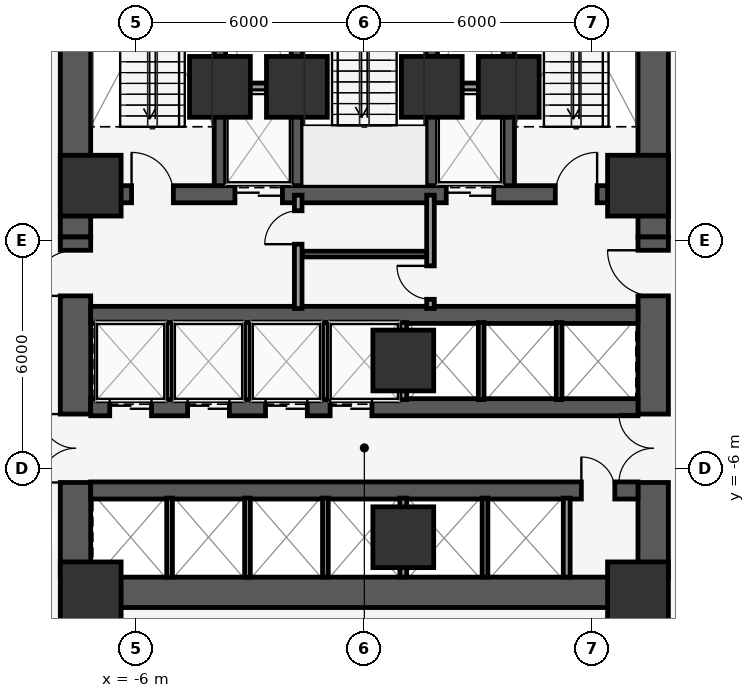
"""IFC4 building model, lengths in metres.
Left out: names, types, materials, properties, quantities, classifications, styles, units other than length and angle.
Written with IfcOpenShell. Run it as: python <this file> out.ifc"""

import sys

from ifc_helpers import new_model, si_unit, direction, frame, frame_2d, origin, origin_2d, place, context, subcontext, project, spatial, rectangle, extrude, element, fill, save


model = new_model("IFC4")
c1 = context("Model", 3, precision=1e-05, world=origin(), true_north=direction((0.0, 1.0)))
c2 = subcontext(c1, "Body", "Model", "MODEL_VIEW")
j1 = project(units=[si_unit("LENGTHUNIT", "METRE"), si_unit("PLANEANGLEUNIT", "RADIAN")], contexts=[c1])
p1 = place(None, origin())
s1 = spatial("IfcSite", under=j1, at=p1, CompositionType="ELEMENT")
p2 = place(p1, origin())
s2 = spatial("IfcBuilding", under=s1, at=p2, CompositionType="ELEMENT")
p3 = place(p2, frame((0.0, 0.0, 17.5)))
s3 = spatial("IfcBuildingStorey", under=s2, at=p3, CompositionType="ELEMENT", Elevation=17.5)
p4 = place(p3, frame((-7.2, 1.225, 0.0), z_axis=(0.0, 0.0, 1.0), x_axis=(1.0, 0.0, 0.0)))
e1 = element("IfcWall", 1, at=p4, inside=s3, PredefinedType="SHEAR", context=c2, shape_type="SweptSolid", body=[
    extrude(rectangle(XDim=14.4, YDim=0.45, at=frame_2d((7.2, 0.0))), origin(), (0.0, 0.0, 1.0), 5.7),
])
p5 = place(p4, frame((3.795, 0.0, 0.0)))
e2 = element("IfcOpeningElement", 2, at=p5, cuts=e1, PredefinedType="OPENING", context=c2, shape_type="SweptSolid", body=[
    extrude(rectangle(XDim=1.25, YDim=2.25, at=frame_2d((0.625, 1.125))), frame((0.0, 0.235, 0.0), z_axis=(0.0, -1.0, 0.0), x_axis=(1.0, 0.0, 0.0)), (0.0, 0.0, 1.0), 0.47),
])
p6 = place(p4, frame((9.355, 0.0, 0.0)))
e3 = element("IfcOpeningElement", 3, at=p6, cuts=e1, PredefinedType="OPENING", context=c2, shape_type="SweptSolid", body=[
    extrude(rectangle(XDim=1.25, YDim=2.25, at=frame_2d((0.625, 1.125))), frame((0.0, 0.235, 0.0), z_axis=(0.0, -1.0, 0.0), x_axis=(1.0, 0.0, 0.0)), (0.0, 0.0, 1.0), 0.47),
])
p7 = place(p4, frame((1.075, 0.0, 0.0)))
e4 = element("IfcOpeningElement", 4, at=p7, cuts=e1, PredefinedType="OPENING", context=c2, shape_type="SweptSolid", body=[
    extrude(rectangle(XDim=1.1, YDim=2.15, at=frame_2d((0.55, 1.075))), frame((0.0, 0.235, 0.0), z_axis=(0.0, -1.0, 0.0), x_axis=(1.0, 0.0, 0.0)), (0.0, 0.0, 1.0), 0.47),
])
p8 = place(p4, frame((12.225, 0.0, 0.0)))
e5 = element("IfcOpeningElement", 5, at=p8, cuts=e1, PredefinedType="OPENING", context=c2, shape_type="SweptSolid", body=[
    extrude(rectangle(XDim=1.1, YDim=2.15, at=frame_2d((0.55, 1.075))), frame((0.0, 0.235, 0.0), z_axis=(0.0, -1.0, 0.0), x_axis=(1.0, 0.0, 0.0)), (0.0, 0.0, 1.0), 0.47),
])
for number, where, z_axis, x_axis in (
    (6, (-3.8, 1.45, 0.0), (0.0, 0.0, 1.0), (0.0, 1.0, 0.0)),
    (7, (-1.775, 1.45, 0.0), (0.0, 0.0, 1.0), (0.0, 1.0, 0.0)),
    (8, (1.775, 1.45, 0.0), (0.0, 0.0, 1.0), (0.0, 1.0, 0.0)),
    (9, (3.8, 1.45, 0.0), (0.0, 0.0, 1.0), (0.0, 1.0, 0.0)),
):
    element("IfcWall", number, at=place(p3, frame(where, z_axis=z_axis, x_axis=x_axis)), inside=s3, PredefinedType="SHEAR", context=c2, shape_type="SweptSolid", body=[
        extrude(rectangle(XDim=7.7, YDim=0.3, at=frame_2d((3.85, 0.0))), origin(), (0.0, 0.0, 1.0), 5.7),
    ])
for number, where, z_axis, x_axis in (
    (10, (-7.6, 0.1, 0.0), (0.0, 0.0, 1.0), (0.0, 1.0, 0.0)),
    (11, (7.6, 0.1, 0.0), (0.0, 0.0, 1.0), (0.0, 1.0, 0.0)),
):
    element("IfcWall", number, at=place(p3, frame(where, z_axis=z_axis, x_axis=x_axis)), inside=s3, PredefinedType="SHEAR", context=c2, shape_type="SweptSolid", body=[
        extrude(rectangle(XDim=9.05, YDim=0.8, at=frame_2d((4.525, 0.0))), origin(), (0.0, 0.0, 1.0), 5.7),
    ])
p9 = place(p3, frame((-7.6, -8.85, 0.0), z_axis=(0.0, 0.0, 1.0), x_axis=(0.0, 1.0, 0.0)))
e12 = element("IfcWall", 12, at=p9, inside=s3, PredefinedType="SHEAR", context=c2, shape_type="SweptSolid", body=[
    extrude(rectangle(XDim=8.95, YDim=0.8, at=frame_2d((4.475, 0.0))), origin(), (0.0, 0.0, 1.0), 5.7),
])
p10 = place(p9, frame((2.49, 0.0, 0.0)))
e13 = element("IfcOpeningElement", 13, at=p10, cuts=e12, PredefinedType="OPENING", context=c2, shape_type="SweptSolid", body=[
    extrude(rectangle(XDim=1.8, YDim=2.2, at=frame_2d((0.9, 1.1))), frame((0.0, 0.41, 0.0), z_axis=(0.0, -1.0, 0.0), x_axis=(1.0, 0.0, 0.0)), (0.0, 0.0, 1.0), 0.82),
])
p11 = place(p9, frame((7.4, 0.0, 0.0)))
e14 = element("IfcOpeningElement", 14, at=p11, cuts=e12, PredefinedType="OPENING", context=c2, shape_type="SweptSolid", body=[
    extrude(rectangle(XDim=1.2, YDim=2.15, at=frame_2d((0.6, 1.075))), frame((0.0, 0.41, 0.0), z_axis=(0.0, -1.0, 0.0), x_axis=(1.0, 0.0, 0.0)), (0.0, 0.0, 1.0), 0.82),
])
p12 = place(p3, frame((7.6, -8.85, 0.0), z_axis=(0.0, 0.0, 1.0), x_axis=(0.0, 1.0, 0.0)))
e15 = element("IfcWall", 15, at=p12, inside=s3, PredefinedType="SHEAR", context=c2, shape_type="SweptSolid", body=[
    extrude(rectangle(XDim=8.95, YDim=0.8, at=frame_2d((4.475, 0.0))), origin(), (0.0, 0.0, 1.0), 5.7),
])
p13 = place(p12, frame((2.49, 0.0, 0.0)))
e16 = element("IfcOpeningElement", 16, at=p13, cuts=e15, PredefinedType="OPENING", context=c2, shape_type="SweptSolid", body=[
    extrude(rectangle(XDim=1.8, YDim=2.2, at=frame_2d((0.9, 1.1))), frame((0.0, 0.41, 0.0), z_axis=(0.0, -1.0, 0.0), x_axis=(1.0, 0.0, 0.0)), (0.0, 0.0, 1.0), 0.82),
])
p14 = place(p12, frame((7.4, 0.0, 0.0)))
e17 = element("IfcOpeningElement", 17, at=p14, cuts=e15, PredefinedType="OPENING", context=c2, shape_type="SweptSolid", body=[
    extrude(rectangle(XDim=1.2, YDim=2.15, at=frame_2d((0.6, 1.075))), frame((0.0, 0.41, 0.0), z_axis=(0.0, -1.0, 0.0), x_axis=(1.0, 0.0, 0.0)), (0.0, 0.0, 1.0), 0.82),
])
p15 = place(p3, frame((-7.6, -9.25, 0.0), z_axis=(0.0, 0.0, 1.0), x_axis=(1.0, 0.0, 0.0)))
e18 = element("IfcWall", 18, at=p15, inside=s3, PredefinedType="SHEAR", context=c2, shape_type="SweptSolid", body=[
    extrude(rectangle(XDim=15.2, YDim=0.8, at=frame_2d((7.6, 0.0))), origin(), (0.0, 0.0, 1.0), 5.7),
])
p16 = place(p3, frame((-7.2, -1.95, 0.0), z_axis=(0.0, 0.0, 1.0), x_axis=(1.0, 0.0, 0.0)))
e19 = element("IfcWall", 19, at=p16, inside=s3, PredefinedType="SHEAR", context=c2, shape_type="SweptSolid", body=[
    extrude(rectangle(XDim=14.4, YDim=0.45, at=frame_2d((7.2, 0.0))), origin(), (0.0, 0.0, 1.0), 5.7),
])
p17 = place(p3, frame((-7.2, -4.38, 0.0), z_axis=(0.0, 0.0, 1.0), x_axis=(1.0, 0.0, 0.0)))
e20 = element("IfcWall", 20, at=p17, inside=s3, PredefinedType="SHEAR", context=c2, shape_type="SweptSolid", body=[
    extrude(rectangle(XDim=14.4, YDim=0.45, at=frame_2d((7.2, 0.0))), origin(), (0.0, 0.0, 1.0), 5.7),
])
p18 = place(p17, frame((0.5, 0.0, 0.0)))
e21 = element("IfcOpeningElement", 21, at=p18, cuts=e20, PredefinedType="OPENING", context=c2, shape_type="SweptSolid", body=[
    extrude(rectangle(XDim=1.1, YDim=2.2, at=frame_2d((0.55, 1.1))), frame((0.0, 0.235, 0.0), z_axis=(0.0, -1.0, 0.0), x_axis=(1.0, 0.0, 0.0)), (0.0, 0.0, 1.0), 0.47),
])
p19 = place(p17, frame((2.55, 0.0, 0.0)))
e22 = element("IfcOpeningElement", 22, at=p19, cuts=e20, PredefinedType="OPENING", context=c2, shape_type="SweptSolid", body=[
    extrude(rectangle(XDim=1.1, YDim=2.2, at=frame_2d((0.55, 1.1))), frame((0.0, 0.235, 0.0), z_axis=(0.0, -1.0, 0.0), x_axis=(1.0, 0.0, 0.0)), (0.0, 0.0, 1.0), 0.47),
])
p20 = place(p17, frame((4.6, 0.0, 0.0)))
e23 = element("IfcOpeningElement", 23, at=p20, cuts=e20, PredefinedType="OPENING", context=c2, shape_type="SweptSolid", body=[
    extrude(rectangle(XDim=1.1, YDim=2.2, at=frame_2d((0.55, 1.1))), frame((0.0, 0.235, 0.0), z_axis=(0.0, -1.0, 0.0), x_axis=(1.0, 0.0, 0.0)), (0.0, 0.0, 1.0), 0.47),
])
p21 = place(p17, frame((6.3, 0.0, 0.0)))
e24 = element("IfcOpeningElement", 24, at=p21, cuts=e20, PredefinedType="OPENING", context=c2, shape_type="SweptSolid", body=[
    extrude(rectangle(XDim=1.1, YDim=2.2, at=frame_2d((0.55, 1.1))), frame((0.0, 0.235, 0.0), z_axis=(0.0, -1.0, 0.0), x_axis=(1.0, 0.0, 0.0)), (0.0, 0.0, 1.0), 0.47),
])
p22 = place(p3, frame((-7.2, -6.57, 0.0), z_axis=(0.0, 0.0, 1.0), x_axis=(1.0, 0.0, 0.0)))
e25 = element("IfcWall", 25, at=p22, inside=s3, PredefinedType="SHEAR", context=c2, shape_type="SweptSolid", body=[
    extrude(rectangle(XDim=14.4, YDim=0.45, at=frame_2d((7.2, 0.0))), origin(), (0.0, 0.0, 1.0), 5.7),
])
p23 = place(p22, frame((12.91, 0.0, 0.0)))
e26 = element("IfcOpeningElement", 26, at=p23, cuts=e25, PredefinedType="OPENING", context=c2, shape_type="SweptSolid", body=[
    extrude(rectangle(XDim=0.88, YDim=2.15, at=frame_2d((0.44, 1.075))), frame((0.0, 0.235, 0.0), z_axis=(0.0, -1.0, 0.0), x_axis=(1.0, 0.0, 0.0)), (0.0, 0.0, 1.0), 0.47),
])
for number, where, z_axis, x_axis in (
    (27, (-7.2, -9.25, 0.0), (0.0, 0.0, 1.0), (1.0, 0.0, 0.0)),
    (28, (7.2, -9.25, 0.0), (0.0, 0.0, 1.0), (1.0, 0.0, 0.0)),
    (29, (7.2, 1.45, 0.0), (0.0, 0.0, 1.0), (1.0, 0.0, 0.0)),
    (30, (-7.2, 1.45, 0.0), (0.0, 0.0, 1.0), (1.0, 0.0, 0.0)),
    (31, (-3.8, 4.05, 0.0), (0.0, 0.0, 1.0), (1.0, 0.0, 0.0)),
    (32, (3.8, 4.05, 0.0), (0.0, 0.0, 1.0), (1.0, 0.0, 0.0)),
    (33, (-1.775, 4.05, 0.0), (0.0, 0.0, 1.0), (1.0, 0.0, 0.0)),
    (34, (1.775, 4.05, 0.0), (0.0, 0.0, 1.0), (1.0, 0.0, 0.0)),
    (35, (1.025, -3.15, 0.0), (0.0, 0.0, 1.0), (1.0, 0.0, 0.0)),
    (36, (1.025, -7.8, 0.0), (0.0, 0.0, 1.0), (1.0, 0.0, 0.0)),
):
    element("IfcColumn", number, at=place(p3, frame(where, z_axis=z_axis, x_axis=x_axis)), inside=s3, PredefinedType="COLUMN", context=c2, shape_type="SweptSolid", body=[
        extrude(rectangle(XDim=1.6, YDim=1.6, at=origin_2d()), origin(), (0.0, 0.0, 1.0), 6.0),
    ])
for number, where, z_axis, x_axis in (
    (37, (-3.65, 4.05, 0.0), (0.0, 0.0, 1.0), (1.0, 0.0, 0.0)),
    (38, (1.92, 4.05, 0.0), (0.0, 0.0, 1.0), (1.0, 0.0, 0.0)),
):
    element("IfcWall", number, at=place(p3, frame(where, z_axis=z_axis, x_axis=x_axis)), inside=s3, PredefinedType="PARTITIONING", context=c2, shape_type="SweptSolid", body=[
        extrude(rectangle(XDim=1.73, YDim=0.2, at=frame_2d((0.865, 0.0))), origin(), (0.0, 0.0, 1.0), 5.7),
    ])
for number, where, z_axis, x_axis in (
    (39, (-5.125, -4.18, 0.0), (0.0, 0.0, 1.0), (0.0, 1.0, 0.0)),
    (40, (-3.075, -4.18, 0.0), (0.0, 0.0, 1.0), (0.0, 1.0, 0.0)),
    (41, (-1.025, -4.18, 0.0), (0.0, 0.0, 1.0), (0.0, 1.0, 0.0)),
):
    element("IfcWall", number, at=place(p3, frame(where, z_axis=z_axis, x_axis=x_axis)), inside=s3, PredefinedType="PARTITIONING", context=c2, shape_type="SweptSolid", body=[
        extrude(rectangle(XDim=2.03, YDim=0.15, at=frame_2d((1.015, 0.0))), origin(), (0.0, 0.0, 1.0), 5.7),
    ])
p24 = place(p3, frame((1.025, -4.18, 0.0), z_axis=(0.0, 0.0, 1.0), x_axis=(0.0, 1.0, 0.0)))
e42 = element("IfcWall", 42, at=p24, inside=s3, PredefinedType="PARTITIONING", context=c2, shape_type="SweptSolid", body=[
    extrude(rectangle(XDim=2.03, YDim=0.18, at=frame_2d((1.015, 0.0))), origin(), (0.0, 0.0, 1.0), 4.748),
])
for number, where, z_axis, x_axis in (
    (43, (3.075, -4.18, 0.0), (0.0, 0.0, 1.0), (0.0, 1.0, 0.0)),
    (44, (5.125, -4.18, 0.0), (0.0, 0.0, 1.0), (0.0, 1.0, 0.0)),
):
    element("IfcWall", number, at=place(p3, frame(where, z_axis=z_axis, x_axis=x_axis)), inside=s3, PredefinedType="PARTITIONING", context=c2, shape_type="SweptSolid", body=[
        extrude(rectangle(XDim=2.03, YDim=0.15, at=frame_2d((1.015, 0.0))), origin(), (0.0, 0.0, 1.0), 5.7),
    ])
for number, where, z_axis, x_axis in (
    (45, (-5.125, -8.85, 0.0), (0.0, 0.0, 1.0), (0.0, 1.0, 0.0)),
    (46, (-3.075, -8.85, 0.0), (0.0, 0.0, 1.0), (0.0, 1.0, 0.0)),
    (47, (-1.025, -8.85, 0.0), (0.0, 0.0, 1.0), (0.0, 1.0, 0.0)),
):
    element("IfcWall", number, at=place(p3, frame(where, z_axis=z_axis, x_axis=x_axis)), inside=s3, PredefinedType="PARTITIONING", context=c2, shape_type="SweptSolid", body=[
        extrude(rectangle(XDim=2.08, YDim=0.15, at=frame_2d((1.04, 0.0))), origin(), (0.0, 0.0, 1.0), 5.7),
    ])
p25 = place(p3, frame((1.025, -8.85, 0.0), z_axis=(0.0, 0.0, 1.0), x_axis=(0.0, 1.0, 0.0)))
e48 = element("IfcWall", 48, at=p25, inside=s3, PredefinedType="PARTITIONING", context=c2, shape_type="SweptSolid", body=[
    extrude(rectangle(XDim=2.08, YDim=0.18, at=frame_2d((1.04, 0.0))), origin(), (0.0, 0.0, 1.0), 4.748),
])
p26 = place(p3, frame((3.175, -8.85, 0.0), z_axis=(0.0, 0.0, 1.0), x_axis=(0.0, 1.0, 0.0)))
e49 = element("IfcWall", 49, at=p26, inside=s3, PredefinedType="PARTITIONING", context=c2, shape_type="SweptSolid", body=[
    extrude(rectangle(XDim=2.08, YDim=0.15, at=frame_2d((1.04, 0.0))), origin(), (0.0, 0.0, 1.0), 5.7),
])
p27 = place(p3, frame((5.325, -8.85, 0.0), z_axis=(0.0, 0.0, 1.0), x_axis=(0.0, 1.0, 0.0)))
e50 = element("IfcWall", 50, at=p27, inside=s3, PredefinedType="PARTITIONING", context=c2, shape_type="SweptSolid", body=[
    extrude(rectangle(XDim=2.08, YDim=0.18, at=frame_2d((1.04, 0.0))), origin(), (0.0, 0.0, 1.0), 5.7),
])
p28 = place(p3, frame((-1.74, -1.78, 0.0), z_axis=(0.0, 0.0, 1.0), x_axis=(0.0, 1.0, 0.0)))
e51 = element("IfcWall", 51, at=p28, inside=s3, PredefinedType="PARTITIONING", context=c2, shape_type="SweptSolid", body=[
    extrude(rectangle(XDim=2.98, YDim=0.2, at=frame_2d((1.49, 0.0))), origin(), (0.0, 0.0, 1.0), 5.7),
])
p29 = place(p28, frame((1.69, 0.0, 0.0)))
e52 = element("IfcOpeningElement", 52, at=p29, cuts=e51, PredefinedType="OPENING", context=c2, shape_type="SweptSolid", body=[
    extrude(rectangle(XDim=0.88, YDim=2.15, at=frame_2d((0.44, 1.075))), frame((0.0, 0.11, 0.0), z_axis=(0.0, -1.0, 0.0), x_axis=(1.0, 0.0, 0.0)), (0.0, 0.0, 1.0), 0.22),
])
p30 = place(p3, frame((1.74, -1.78, 0.0), z_axis=(0.0, 0.0, 1.0), x_axis=(0.0, 1.0, 0.0)))
e53 = element("IfcWall", 53, at=p30, inside=s3, PredefinedType="PARTITIONING", context=c2, shape_type="SweptSolid", body=[
    extrude(rectangle(XDim=2.98, YDim=0.2, at=frame_2d((1.49, 0.0))), origin(), (0.0, 0.0, 1.0), 5.7),
])
p31 = place(p30, frame((0.24, 0.0, 0.0)))
e54 = element("IfcOpeningElement", 54, at=p31, cuts=e53, PredefinedType="OPENING", context=c2, shape_type="SweptSolid", body=[
    extrude(rectangle(XDim=0.88, YDim=2.15, at=frame_2d((0.44, 1.075))), frame((0.0, 0.11, 0.0), z_axis=(0.0, -1.0, 0.0), x_axis=(1.0, 0.0, 0.0)), (0.0, 0.0, 1.0), 0.22),
])
p32 = place(p3, frame((-1.63, -0.35, 0.0), z_axis=(0.0, 0.0, 1.0), x_axis=(1.0, 0.0, 0.0)))
e55 = element("IfcWall", 55, at=p32, inside=s3, PredefinedType="PARTITIONING", context=c2, shape_type="SweptSolid", body=[
    extrude(rectangle(XDim=3.26, YDim=0.15, at=frame_2d((1.63, 0.0))), origin(), (0.0, 0.0, 1.0), 5.7),
])
p33 = place(p18, origin())
e56 = element("IfcDoor", 56, at=p33, inside=s3, OperationType="DOUBLE_DOOR_SLIDING", PredefinedType="DOOR", context=c2, shape_type="SweptSolid", body=[
    extrude(rectangle(XDim=1.1, YDim=2.2, at=frame_2d((0.55, 1.1))), frame((0.0, 0.025, 0.0), z_axis=(0.0, -1.0, 0.0), x_axis=(1.0, 0.0, 0.0)), (0.0, 0.0, 1.0), 0.05),
])
fill(e21, e56)
p34 = place(p19, origin())
e57 = element("IfcDoor", 57, at=p34, inside=s3, OperationType="DOUBLE_DOOR_SLIDING", PredefinedType="DOOR", context=c2, shape_type="SweptSolid", body=[
    extrude(rectangle(XDim=1.1, YDim=2.2, at=frame_2d((0.55, 1.1))), frame((0.0, 0.025, 0.0), z_axis=(0.0, -1.0, 0.0), x_axis=(1.0, 0.0, 0.0)), (0.0, 0.0, 1.0), 0.05),
])
fill(e22, e57)
p35 = place(p20, origin())
e58 = element("IfcDoor", 58, at=p35, inside=s3, OperationType="DOUBLE_DOOR_SLIDING", PredefinedType="DOOR", context=c2, shape_type="SweptSolid", body=[
    extrude(rectangle(XDim=1.1, YDim=2.2, at=frame_2d((0.55, 1.1))), frame((0.0, 0.025, 0.0), z_axis=(0.0, -1.0, 0.0), x_axis=(1.0, 0.0, 0.0)), (0.0, 0.0, 1.0), 0.05),
])
fill(e23, e58)
p36 = place(p21, origin())
e59 = element("IfcDoor", 59, at=p36, inside=s3, OperationType="DOUBLE_DOOR_SLIDING", PredefinedType="DOOR", context=c2, shape_type="SweptSolid", body=[
    extrude(rectangle(XDim=1.1, YDim=2.2, at=frame_2d((0.55, 1.1))), frame((0.0, 0.025, 0.0), z_axis=(0.0, -1.0, 0.0), x_axis=(1.0, 0.0, 0.0)), (0.0, 0.0, 1.0), 0.05),
])
fill(e24, e59)
p37 = place(p5, origin())
e60 = element("IfcDoor", 60, at=p37, inside=s3, OperationType="DOUBLE_DOOR_SLIDING", PredefinedType="DOOR", context=c2, shape_type="SweptSolid", body=[
    extrude(rectangle(XDim=1.25, YDim=2.25, at=frame_2d((0.625, 1.125))), frame((0.0, 0.025, 0.0), z_axis=(0.0, -1.0, 0.0), x_axis=(1.0, 0.0, 0.0)), (0.0, 0.0, 1.0), 0.05),
])
fill(e2, e60)
p38 = place(p6, origin())
e61 = element("IfcDoor", 61, at=p38, inside=s3, OperationType="DOUBLE_DOOR_SLIDING", PredefinedType="DOOR", context=c2, shape_type="SweptSolid", body=[
    extrude(rectangle(XDim=1.25, YDim=2.25, at=frame_2d((0.625, 1.125))), frame((0.0, 0.025, 0.0), z_axis=(0.0, -1.0, 0.0), x_axis=(1.0, 0.0, 0.0)), (0.0, 0.0, 1.0), 0.05),
])
fill(e3, e61)
p39 = place(p7, origin())
e62 = element("IfcDoor", 62, at=p39, inside=s3, OperationType="SINGLE_SWING_LEFT", PredefinedType="DOOR", context=c2, shape_type="SweptSolid", body=[
    extrude(rectangle(XDim=1.1, YDim=2.15, at=frame_2d((0.55, 1.075))), frame((0.0, 0.025, 0.0), z_axis=(0.0, -1.0, 0.0), x_axis=(1.0, 0.0, 0.0)), (0.0, 0.0, 1.0), 0.05),
])
fill(e4, e62)
p40 = place(p8, origin())
e63 = element("IfcDoor", 63, at=p40, inside=s3, OperationType="SINGLE_SWING_RIGHT", PredefinedType="DOOR", context=c2, shape_type="SweptSolid", body=[
    extrude(rectangle(XDim=1.1, YDim=2.15, at=frame_2d((0.55, 1.075))), frame((0.0, 0.025, 0.0), z_axis=(0.0, -1.0, 0.0), x_axis=(1.0, 0.0, 0.0)), (0.0, 0.0, 1.0), 0.05),
])
fill(e5, e63)
p41 = place(p10, origin())
e64 = element("IfcDoor", 64, at=p41, inside=s3, OperationType="DOUBLE_DOOR_SINGLE_SWING", PredefinedType="DOOR", context=c2, shape_type="SweptSolid", body=[
    extrude(rectangle(XDim=1.8, YDim=2.2, at=frame_2d((0.9, 1.1))), frame((0.0, 0.025, 0.0), z_axis=(0.0, -1.0, 0.0), x_axis=(1.0, 0.0, 0.0)), (0.0, 0.0, 1.0), 0.05),
])
fill(e13, e64)
p42 = place(p11, origin())
e65 = element("IfcDoor", 65, at=p42, inside=s3, OperationType="SINGLE_SWING_LEFT", PredefinedType="DOOR", context=c2, shape_type="SweptSolid", body=[
    extrude(rectangle(XDim=1.2, YDim=2.15, at=frame_2d((0.6, 1.075))), frame((0.0, 0.025, 0.0), z_axis=(0.0, -1.0, 0.0), x_axis=(1.0, 0.0, 0.0)), (0.0, 0.0, 1.0), 0.05),
])
fill(e14, e65)
p43 = place(p13, origin())
e66 = element("IfcDoor", 66, at=p43, inside=s3, OperationType="DOUBLE_DOOR_SINGLE_SWING", PredefinedType="DOOR", context=c2, shape_type="SweptSolid", body=[
    extrude(rectangle(XDim=1.8, YDim=2.2, at=frame_2d((0.9, 1.1))), frame((0.0, 0.025, 0.0), z_axis=(0.0, -1.0, 0.0), x_axis=(1.0, 0.0, 0.0)), (0.0, 0.0, 1.0), 0.05),
])
fill(e16, e66)
p44 = place(p14, origin())
e67 = element("IfcDoor", 67, at=p44, inside=s3, OperationType="SINGLE_SWING_RIGHT", PredefinedType="DOOR", context=c2, shape_type="SweptSolid", body=[
    extrude(rectangle(XDim=1.2, YDim=2.15, at=frame_2d((0.6, 1.075))), frame((0.0, 0.025, 0.0), z_axis=(0.0, -1.0, 0.0), x_axis=(1.0, 0.0, 0.0)), (0.0, 0.0, 1.0), 0.05),
])
fill(e17, e67)
p45 = place(p23, origin())
e68 = element("IfcDoor", 68, at=p45, inside=s3, OperationType="SINGLE_SWING_LEFT", PredefinedType="DOOR", context=c2, shape_type="SweptSolid", body=[
    extrude(rectangle(XDim=0.88, YDim=2.15, at=frame_2d((0.44, 1.075))), frame((0.0, 0.025, 0.0), z_axis=(0.0, -1.0, 0.0), x_axis=(1.0, 0.0, 0.0)), (0.0, 0.0, 1.0), 0.05),
])
fill(e26, e68)
p46 = place(p29, origin())
e69 = element("IfcDoor", 69, at=p46, inside=s3, OperationType="SINGLE_SWING_LEFT", PredefinedType="DOOR", context=c2, shape_type="SweptSolid", body=[
    extrude(rectangle(XDim=0.88, YDim=2.15, at=frame_2d((0.44, 1.075))), frame((0.0, 0.025, 0.0), z_axis=(0.0, -1.0, 0.0), x_axis=(1.0, 0.0, 0.0)), (0.0, 0.0, 1.0), 0.05),
])
fill(e52, e69)
p47 = place(p31, origin())
e70 = element("IfcDoor", 70, at=p47, inside=s3, OperationType="SINGLE_SWING_RIGHT", PredefinedType="DOOR", context=c2, shape_type="SweptSolid", body=[
    extrude(rectangle(XDim=0.88, YDim=2.15, at=frame_2d((0.44, 1.075))), frame((0.0, 0.025, 0.0), z_axis=(0.0, -1.0, 0.0), x_axis=(1.0, 0.0, 0.0)), (0.0, 0.0, 1.0), 0.05),
])
fill(e54, e70)
save(model, sys.argv[1])
